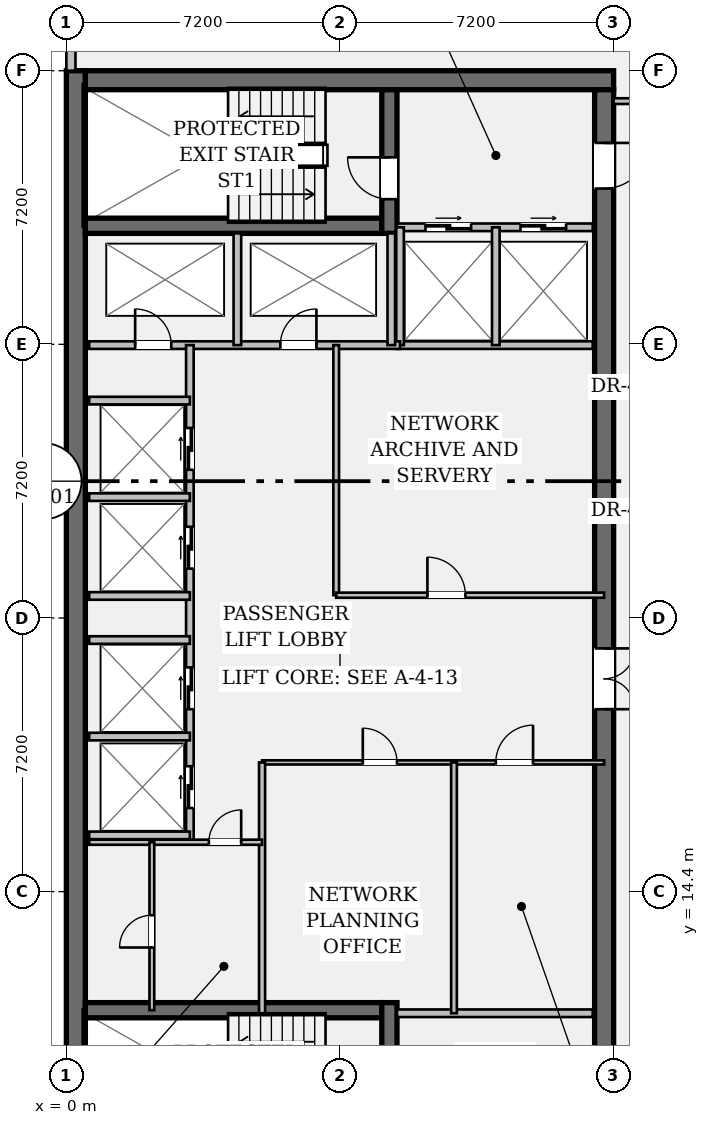
"""IFC4 building model, lengths in metres.
Left out: names, types, materials, properties, quantities, classifications, styles, units other than length and angle.
Written with IfcOpenShell. Run it as: python <this file> out.ifc"""

import sys

from ifc_helpers import new_model, si_unit, direction, frame, frame_2d, origin, place, context, subcontext, project, spatial, rectangle, extrude, element, fill, save


model = new_model("IFC4")
c1 = context("Model", 3, precision=1e-05, world=origin(), true_north=direction((0.0, 1.0)))
c2 = subcontext(c1, "Body", "Model", "MODEL_VIEW")
j1 = project(units=[si_unit("LENGTHUNIT", "METRE"), si_unit("PLANEANGLEUNIT", "RADIAN")], contexts=[c1])
p1 = place(None, origin())
s1 = spatial("IfcSite", under=j1, at=p1, CompositionType="ELEMENT")
p2 = place(p1, origin())
s2 = spatial("IfcBuilding", under=s1, at=p2, CompositionType="ELEMENT")
p3 = place(p2, frame((0.0, 0.0, 262.15)))
s3 = spatial("IfcBuildingStorey", under=s2, at=p3, CompositionType="ELEMENT", Elevation=262.15)
p4 = place(p3, frame((0.25, 7.2, 0.0), z_axis=(0.0, 0.0, 1.0), x_axis=(0.0, 1.0, 0.0)))
e1 = element("IfcWall", 1, at=p4, inside=s3, PredefinedType="SHEAR", context=c2, shape_type="SweptSolid", body=[
    extrude(rectangle(XDim=28.8, YDim=0.5, at=frame_2d((14.4, 0.0))), origin(), (0.0, 0.0, 1.0), 3.24),
])
p5 = place(p3, frame((0.5, 35.75, 0.0), z_axis=(0.0, 0.0, 1.0), x_axis=(1.0, 0.0, 0.0)))
e2 = element("IfcWall", 2, at=p5, inside=s3, PredefinedType="SHEAR", context=c2, shape_type="SweptSolid", body=[
    extrude(rectangle(XDim=13.9, YDim=0.5, at=frame_2d((6.95, 0.0))), origin(), (0.0, 0.0, 1.0), 3.24),
])
p6 = place(p3, frame((14.15, 35.5, 0.0), z_axis=(0.0, 0.0, 1.0), x_axis=(0.0, -1.0, 0.0)))
e3 = element("IfcWall", 3, at=p6, inside=s3, PredefinedType="SHEAR", context=c2, shape_type="SweptSolid", body=[
    extrude(rectangle(XDim=27.8, YDim=0.5, at=frame_2d((13.9, 0.0))), origin(), (0.0, 0.0, 1.0), 3.24),
])
p7 = place(p6, frame((1.4, 0.0, 0.0)))
e4 = element("IfcOpeningElement", 4, at=p7, cuts=e3, PredefinedType="OPENING", context=c2, shape_type="SweptSolid", body=[
    extrude(rectangle(XDim=1.2, YDim=2.15, at=frame_2d((0.6, 1.075))), frame((0.0, 0.262, 0.0), z_axis=(0.0, -1.0, 0.0), x_axis=(1.0, 0.0, 0.0)), (0.0, 0.0, 1.0), 0.524),
])
p8 = place(p6, frame((25.35, 0.0, 0.0)))
e5 = element("IfcOpeningElement", 5, at=p8, cuts=e3, PredefinedType="OPENING", context=c2, shape_type="SweptSolid", body=[
    extrude(rectangle(XDim=1.2, YDim=2.15, at=frame_2d((0.6, 1.075))), frame((0.0, 0.262, 0.0), z_axis=(0.0, -1.0, 0.0), x_axis=(1.0, 0.0, 0.0)), (0.0, 0.0, 1.0), 0.524),
])
p9 = place(p6, frame((14.7, 0.0, 0.0)))
e6 = element("IfcOpeningElement", 6, at=p9, cuts=e3, PredefinedType="OPENING", context=c2, shape_type="SweptSolid", body=[
    extrude(rectangle(XDim=1.6, YDim=2.2, at=frame_2d((0.8, 1.1))), frame((0.0, 0.262, 0.0), z_axis=(0.0, -1.0, 0.0), x_axis=(1.0, 0.0, 0.0)), (0.0, 0.0, 1.0), 0.524),
])
for number, where, z_axis, x_axis in (
    (7, (0.5, 31.92, 0.0), (0.0, 0.0, 1.0), (1.0, 0.0, 0.0)),
    (8, (0.5, 11.28, 0.0), (0.0, 0.0, 1.0), (1.0, 0.0, 0.0)),
):
    element("IfcWall", number, at=place(p3, frame(where, z_axis=z_axis, x_axis=x_axis)), inside=s3, PredefinedType="SHEAR", context=c2, shape_type="SweptSolid", body=[
        extrude(rectangle(XDim=7.8, YDim=0.4, at=frame_2d((3.9, 0.0))), origin(), (0.0, 0.0, 1.0), 3.24),
    ])
p10 = place(p3, frame((8.5, 31.72, 0.0), z_axis=(0.0, 0.0, 1.0), x_axis=(0.0, 1.0, 0.0)))
e9 = element("IfcWall", 9, at=p10, inside=s3, PredefinedType="SHEAR", context=c2, shape_type="SweptSolid", body=[
    extrude(rectangle(XDim=3.78, YDim=0.4, at=frame_2d((1.89, 0.0))), origin(), (0.0, 0.0, 1.0), 3.24),
])
p11 = place(p10, frame((0.9, 0.0, 0.0)))
e10 = element("IfcOpeningElement", 10, at=p11, cuts=e9, PredefinedType="OPENING", context=c2, shape_type="SweptSolid", body=[
    extrude(rectangle(XDim=1.1, YDim=2.15, at=frame_2d((0.55, 1.075))), frame((0.0, 0.212, 0.0), z_axis=(0.0, -1.0, 0.0), x_axis=(1.0, 0.0, 0.0)), (0.0, 0.0, 1.0), 0.424),
])
p12 = place(p3, frame((8.5, 7.7, 0.0), z_axis=(0.0, 0.0, 1.0), x_axis=(0.0, 1.0, 0.0)))
e11 = element("IfcWall", 11, at=p12, inside=s3, PredefinedType="SHEAR", context=c2, shape_type="SweptSolid", body=[
    extrude(rectangle(XDim=3.78, YDim=0.4, at=frame_2d((1.89, 0.0))), origin(), (0.0, 0.0, 1.0), 3.24),
])
p13 = place(p12, frame((0.85, 0.0, 0.0)))
e12 = element("IfcOpeningElement", 12, at=p13, cuts=e11, PredefinedType="OPENING", context=c2, shape_type="SweptSolid", body=[
    extrude(rectangle(XDim=1.1, YDim=2.15, at=frame_2d((0.55, 1.075))), frame((0.0, 0.212, 0.0), z_axis=(0.0, -1.0, 0.0), x_axis=(1.0, 0.0, 0.0)), (0.0, 0.0, 1.0), 0.424),
])
p14 = place(p3, frame((0.12, 36.0, 0.0), z_axis=(0.0, 0.0, 1.0), x_axis=(0.0, 1.0, 0.0)))
e13 = element("IfcWall", 13, at=p14, inside=s3, PredefinedType="STANDARD", context=c2, shape_type="SweptSolid", body=[
    extrude(rectangle(XDim=1.29, YDim=0.24, at=frame_2d((0.645, 0.0))), origin(), (0.0, 0.0, 1.0), 3.24),
])
p15 = place(p3, frame((8.7, 31.88, 0.0), z_axis=(0.0, 0.0, 1.0), x_axis=(1.0, 0.0, 0.0)))
e14 = element("IfcWall", 14, at=p15, inside=s3, PredefinedType="PARTITIONING", context=c2, shape_type="SweptSolid", body=[
    extrude(rectangle(XDim=5.15, YDim=0.2, at=frame_2d((2.575, 0.0))), origin(), (0.0, 0.0, 1.0), 3.24),
])
p16 = place(p15, frame((0.75, 0.0, 0.0)))
e15 = element("IfcOpeningElement", 15, at=p16, cuts=e14, PredefinedType="OPENING", context=c2, shape_type="SweptSolid", body=[
    extrude(rectangle(XDim=1.2, YDim=2.2, at=frame_2d((0.6, 1.1))), frame((0.0, 0.112, 0.0), z_axis=(0.0, -1.0, 0.0), x_axis=(1.0, 0.0, 0.0)), (0.0, 0.0, 1.0), 0.224),
])
p17 = place(p15, frame((3.25, 0.0, 0.0)))
e16 = element("IfcOpeningElement", 16, at=p17, cuts=e14, PredefinedType="OPENING", context=c2, shape_type="SweptSolid", body=[
    extrude(rectangle(XDim=1.2, YDim=2.2, at=frame_2d((0.6, 1.1))), frame((0.0, 0.112, 0.0), z_axis=(0.0, -1.0, 0.0), x_axis=(1.0, 0.0, 0.0)), (0.0, 0.0, 1.0), 0.224),
])
for number, where, z_axis, x_axis in (
    (17, (8.7, 11.2, 0.0), (0.0, 0.0, 1.0), (1.0, 0.0, 0.0)),
    (18, (8.7, 28.78, 0.0), (0.0, 0.0, 1.0), (1.0, 0.0, 0.0)),
):
    element("IfcWall", number, at=place(p3, frame(where, z_axis=z_axis, x_axis=x_axis)), inside=s3, PredefinedType="PARTITIONING", context=c2, shape_type="SweptSolid", body=[
        extrude(rectangle(XDim=5.15, YDim=0.2, at=frame_2d((2.575, 0.0))), origin(), (0.0, 0.0, 1.0), 3.24),
    ])
for number, where, z_axis, x_axis in (
    (19, (8.78, 28.78, 0.0), (0.0, 0.0, 1.0), (0.0, 1.0, 0.0)),
    (20, (11.3, 28.78, 0.0), (0.0, 0.0, 1.0), (0.0, 1.0, 0.0)),
):
    element("IfcWall", number, at=place(p3, frame(where, z_axis=z_axis, x_axis=x_axis)), inside=s3, PredefinedType="PARTITIONING", context=c2, shape_type="SweptSolid", body=[
        extrude(rectangle(XDim=3.1, YDim=0.2, at=frame_2d((1.55, 0.0))), origin(), (0.0, 0.0, 1.0), 3.24),
    ])
p18 = place(p3, frame((0.6, 28.78, 0.0), z_axis=(0.0, 0.0, 1.0), x_axis=(1.0, 0.0, 0.0)))
e21 = element("IfcWall", 21, at=p18, inside=s3, PredefinedType="PARTITIONING", context=c2, shape_type="SweptSolid", body=[
    extrude(rectangle(XDim=8.18, YDim=0.2, at=frame_2d((4.09, 0.0))), origin(), (0.0, 0.0, 1.0), 3.24),
])
p19 = place(p18, frame((1.21, 0.0, 0.0)))
e22 = element("IfcOpeningElement", 22, at=p19, cuts=e21, PredefinedType="OPENING", context=c2, shape_type="SweptSolid", body=[
    extrude(rectangle(XDim=0.95, YDim=2.15, at=frame_2d((0.475, 1.075))), frame((0.0, 0.112, 0.0), z_axis=(0.0, -1.0, 0.0), x_axis=(1.0, 0.0, 0.0)), (0.0, 0.0, 1.0), 0.224),
])
p20 = place(p18, frame((5.03, 0.0, 0.0)))
e23 = element("IfcOpeningElement", 23, at=p20, cuts=e21, PredefinedType="OPENING", context=c2, shape_type="SweptSolid", body=[
    extrude(rectangle(XDim=0.95, YDim=2.15, at=frame_2d((0.475, 1.075))), frame((0.0, 0.112, 0.0), z_axis=(0.0, -1.0, 0.0), x_axis=(1.0, 0.0, 0.0)), (0.0, 0.0, 1.0), 0.224),
])
for number, where, z_axis, x_axis in (
    (24, (4.5, 28.78, 0.0), (0.0, 0.0, 1.0), (0.0, 1.0, 0.0)),
    (25, (8.55, 28.78, 0.0), (0.0, 0.0, 1.0), (0.0, 1.0, 0.0)),
):
    element("IfcWall", number, at=place(p3, frame(where, z_axis=z_axis, x_axis=x_axis)), inside=s3, PredefinedType="PARTITIONING", context=c2, shape_type="SweptSolid", body=[
        extrude(rectangle(XDim=2.94, YDim=0.2, at=frame_2d((1.47, 0.0))), origin(), (0.0, 0.0, 1.0), 3.24),
    ])
p21 = place(p3, frame((3.25, 15.7, 0.0), z_axis=(0.0, 0.0, 1.0), x_axis=(0.0, 1.0, 0.0)))
e26 = element("IfcWall", 26, at=p21, inside=s3, PredefinedType="PARTITIONING", context=c2, shape_type="SweptSolid", body=[
    extrude(rectangle(XDim=13.08, YDim=0.2, at=frame_2d((6.54, 0.0))), origin(), (0.0, 0.0, 1.0), 3.24),
])
p22 = place(p21, frame((0.9, 0.0, 0.0)))
e27 = element("IfcOpeningElement", 27, at=p22, cuts=e26, PredefinedType="OPENING", context=c2, shape_type="SweptSolid", body=[
    extrude(rectangle(XDim=1.1, YDim=2.2, at=frame_2d((0.55, 1.1))), frame((0.0, 0.112, 0.0), z_axis=(0.0, -1.0, 0.0), x_axis=(1.0, 0.0, 0.0)), (0.0, 0.0, 1.0), 0.224),
])
p23 = place(p21, frame((3.5, 0.0, 0.0)))
e28 = element("IfcOpeningElement", 28, at=p23, cuts=e26, PredefinedType="OPENING", context=c2, shape_type="SweptSolid", body=[
    extrude(rectangle(XDim=1.1, YDim=2.2, at=frame_2d((0.55, 1.1))), frame((0.0, 0.112, 0.0), z_axis=(0.0, -1.0, 0.0), x_axis=(1.0, 0.0, 0.0)), (0.0, 0.0, 1.0), 0.224),
])
p24 = place(p21, frame((7.2, 0.0, 0.0)))
e29 = element("IfcOpeningElement", 29, at=p24, cuts=e26, PredefinedType="OPENING", context=c2, shape_type="SweptSolid", body=[
    extrude(rectangle(XDim=1.1, YDim=2.2, at=frame_2d((0.55, 1.1))), frame((0.0, 0.112, 0.0), z_axis=(0.0, -1.0, 0.0), x_axis=(1.0, 0.0, 0.0)), (0.0, 0.0, 1.0), 0.224),
])
p25 = place(p21, frame((9.8, 0.0, 0.0)))
e30 = element("IfcOpeningElement", 30, at=p25, cuts=e26, PredefinedType="OPENING", context=c2, shape_type="SweptSolid", body=[
    extrude(rectangle(XDim=1.1, YDim=2.2, at=frame_2d((0.55, 1.1))), frame((0.0, 0.112, 0.0), z_axis=(0.0, -1.0, 0.0), x_axis=(1.0, 0.0, 0.0)), (0.0, 0.0, 1.0), 0.224),
])
for number, where, z_axis, x_axis in (
    (31, (0.6, 15.88, 0.0), (0.0, 0.0, 1.0), (1.0, 0.0, 0.0)),
    (32, (0.6, 18.48, 0.0), (0.0, 0.0, 1.0), (1.0, 0.0, 0.0)),
    (33, (0.6, 22.18, 0.0), (0.0, 0.0, 1.0), (1.0, 0.0, 0.0)),
    (34, (0.6, 24.78, 0.0), (0.0, 0.0, 1.0), (1.0, 0.0, 0.0)),
    (35, (0.6, 21.02, 0.0), (0.0, 0.0, 1.0), (1.0, 0.0, 0.0)),
    (36, (0.6, 27.32, 0.0), (0.0, 0.0, 1.0), (1.0, 0.0, 0.0)),
):
    element("IfcWall", number, at=place(p3, frame(where, z_axis=z_axis, x_axis=x_axis)), inside=s3, PredefinedType="PARTITIONING", context=c2, shape_type="SweptSolid", body=[
        extrude(rectangle(XDim=2.65, YDim=0.2, at=frame_2d((1.325, 0.0))), origin(), (0.0, 0.0, 1.0), 3.24),
    ])
p26 = place(p3, frame((7.1, 22.2, 0.0), z_axis=(0.0, 0.0, 1.0), x_axis=(0.0, 1.0, 0.0)))
e37 = element("IfcWall", 37, at=p26, inside=s3, PredefinedType="PARTITIONING", context=c2, shape_type="SweptSolid", body=[
    extrude(rectangle(XDim=6.58, YDim=0.15, at=frame_2d((3.29, 0.0))), origin(), (0.0, 0.0, 1.0), 3.24),
])
p27 = place(p3, frame((7.1, 22.2, 0.0), z_axis=(0.0, 0.0, 1.0), x_axis=(1.0, 0.0, 0.0)))
e38 = element("IfcWall", 38, at=p27, inside=s3, PredefinedType="PARTITIONING", context=c2, shape_type="SweptSolid", body=[
    extrude(rectangle(XDim=7.05, YDim=0.135, at=frame_2d((3.525, 0.0))), origin(), (0.0, 0.0, 1.0), 3.24),
])
p28 = place(p27, frame((2.4, 0.0, 0.0)))
e39 = element("IfcOpeningElement", 39, at=p28, cuts=e38, PredefinedType="OPENING", context=c2, shape_type="SweptSolid", body=[
    extrude(rectangle(XDim=1.0, YDim=2.15, at=frame_2d((0.5, 1.075))), frame((0.0, 0.08, 0.0), z_axis=(0.0, -1.0, 0.0), x_axis=(1.0, 0.0, 0.0)), (0.0, 0.0, 1.0), 0.159),
])
p29 = place(p3, frame((5.15, 17.8, 0.0), z_axis=(0.0, 0.0, 1.0), x_axis=(1.0, 0.0, 0.0)))
e40 = element("IfcWall", 40, at=p29, inside=s3, PredefinedType="PARTITIONING", context=c2, shape_type="SweptSolid", body=[
    extrude(rectangle(XDim=9.0, YDim=0.11, at=frame_2d((4.5, 0.0))), origin(), (0.0, 0.0, 1.0), 3.24),
])
p30 = place(p29, frame((2.65, 0.0, 0.0)))
e41 = element("IfcOpeningElement", 41, at=p30, cuts=e40, PredefinedType="OPENING", context=c2, shape_type="SweptSolid", body=[
    extrude(rectangle(XDim=0.9, YDim=2.15, at=frame_2d((0.45, 1.075))), frame((0.0, 0.067, 0.0), z_axis=(0.0, -1.0, 0.0), x_axis=(1.0, 0.0, 0.0)), (0.0, 0.0, 1.0), 0.134),
])
p31 = place(p29, frame((6.15, 0.0, 0.0)))
e42 = element("IfcOpeningElement", 42, at=p31, cuts=e40, PredefinedType="OPENING", context=c2, shape_type="SweptSolid", body=[
    extrude(rectangle(XDim=0.98, YDim=2.15, at=frame_2d((0.49, 1.075))), frame((0.0, 0.067, 0.0), z_axis=(0.0, -1.0, 0.0), x_axis=(1.0, 0.0, 0.0)), (0.0, 0.0, 1.0), 0.134),
])
p32 = place(p3, frame((5.15, 11.2, 0.0), z_axis=(0.0, 0.0, 1.0), x_axis=(0.0, 1.0, 0.0)))
e43 = element("IfcWall", 43, at=p32, inside=s3, PredefinedType="PARTITIONING", context=c2, shape_type="SweptSolid", body=[
    extrude(rectangle(XDim=6.6, YDim=0.16, at=frame_2d((3.3, 0.0))), origin(), (0.0, 0.0, 1.0), 3.24),
])
p33 = place(p3, frame((10.2, 11.2, 0.0), z_axis=(0.0, 0.0, 1.0), x_axis=(0.0, 1.0, 0.0)))
e44 = element("IfcWall", 44, at=p33, inside=s3, PredefinedType="PARTITIONING", context=c2, shape_type="SweptSolid", body=[
    extrude(rectangle(XDim=6.6, YDim=0.15, at=frame_2d((3.3, 0.0))), origin(), (0.0, 0.0, 1.0), 3.24),
])
p34 = place(p3, frame((0.6, 15.7, 0.0), z_axis=(0.0, 0.0, 1.0), x_axis=(1.0, 0.0, 0.0)))
e45 = element("IfcWall", 45, at=p34, inside=s3, PredefinedType="PARTITIONING", context=c2, shape_type="SweptSolid", body=[
    extrude(rectangle(XDim=4.55, YDim=0.135, at=frame_2d((2.275, 0.0))), origin(), (0.0, 0.0, 1.0), 3.24),
])
p35 = place(p34, frame((3.15, 0.0, 0.0)))
e46 = element("IfcOpeningElement", 46, at=p35, cuts=e45, PredefinedType="OPENING", context=c2, shape_type="SweptSolid", body=[
    extrude(rectangle(XDim=0.85, YDim=2.15, at=frame_2d((0.425, 1.075))), frame((0.0, 0.08, 0.0), z_axis=(0.0, -1.0, 0.0), x_axis=(1.0, 0.0, 0.0)), (0.0, 0.0, 1.0), 0.159),
])
p36 = place(p3, frame((2.25, 11.28, 0.0), z_axis=(0.0, 0.0, 1.0), x_axis=(0.0, 1.0, 0.0)))
e47 = element("IfcWall", 47, at=p36, inside=s3, PredefinedType="PARTITIONING", context=c2, shape_type="SweptSolid", body=[
    extrude(rectangle(XDim=4.42, YDim=0.125, at=frame_2d((2.21, 0.0))), origin(), (0.0, 0.0, 1.0), 3.24),
])
p37 = place(p36, frame((1.65, 0.0, 0.0)))
e48 = element("IfcOpeningElement", 48, at=p37, cuts=e47, PredefinedType="OPENING", context=c2, shape_type="SweptSolid", body=[
    extrude(rectangle(XDim=0.85, YDim=2.15, at=frame_2d((0.425, 1.075))), frame((0.0, 0.074, 0.0), z_axis=(0.0, -1.0, 0.0), x_axis=(1.0, 0.0, 0.0)), (0.0, 0.0, 1.0), 0.149),
])
p38 = place(p3, frame((14.4, 35.2, 0.0), z_axis=(0.0, 0.0, 1.0), x_axis=(1.0, 0.0, 0.0)))
e49 = element("IfcWall", 49, at=p38, inside=s3, PredefinedType="PARTITIONING", context=c2, shape_type="SweptSolid", body=[
    extrude(rectangle(XDim=2.95, YDim=0.15, at=frame_2d((1.475, 0.0))), origin(), (0.0, 0.0, 1.0), 2.808),
])
p39 = place(p38, frame((0.95, 0.0, 0.0)))
e50 = element("IfcOpeningElement", 50, at=p39, cuts=e49, PredefinedType="OPENING", context=c2, shape_type="SweptSolid", body=[
    extrude(rectangle(XDim=1.0, YDim=2.15, at=frame_2d((0.5, 1.075))), frame((0.0, 0.087, 0.0), z_axis=(0.0, -1.0, 0.0), x_axis=(1.0, 0.0, 0.0)), (0.0, 0.0, 1.0), 0.174),
])
p40 = place(p11, origin())
e51 = element("IfcDoor", 51, at=p40, inside=s3, OperationType="SINGLE_SWING_RIGHT", PredefinedType="DOOR", context=c2, shape_type="SweptSolid", body=[
    extrude(rectangle(XDim=1.1, YDim=2.15, at=frame_2d((0.55, 1.075))), frame((0.0, 0.025, 0.0), z_axis=(0.0, -1.0, 0.0), x_axis=(1.0, 0.0, 0.0)), (0.0, 0.0, 1.0), 0.05),
])
fill(e10, e51)
p41 = place(p7, origin())
e52 = element("IfcDoor", 52, at=p41, inside=s3, OperationType="SINGLE_SWING_LEFT", PredefinedType="DOOR", context=c2, shape_type="SweptSolid", body=[
    extrude(rectangle(XDim=1.2, YDim=2.15, at=frame_2d((0.6, 1.075))), frame((0.0, 0.025, 0.0), z_axis=(0.0, -1.0, 0.0), x_axis=(1.0, 0.0, 0.0)), (0.0, 0.0, 1.0), 0.05),
])
fill(e4, e52)
p42 = place(p16, origin())
e53 = element("IfcDoor", 53, at=p42, inside=s3, OperationType="DOUBLE_DOOR_SLIDING", PredefinedType="DOOR", context=c2, shape_type="SweptSolid", body=[
    extrude(rectangle(XDim=1.2, YDim=2.2, at=frame_2d((0.6, 1.1))), frame((0.0, 0.025, 0.0), z_axis=(0.0, -1.0, 0.0), x_axis=(1.0, 0.0, 0.0)), (0.0, 0.0, 1.0), 0.05),
])
fill(e15, e53)
p43 = place(p17, origin())
e54 = element("IfcDoor", 54, at=p43, inside=s3, OperationType="DOUBLE_DOOR_SLIDING", PredefinedType="DOOR", context=c2, shape_type="SweptSolid", body=[
    extrude(rectangle(XDim=1.2, YDim=2.2, at=frame_2d((0.6, 1.1))), frame((0.0, 0.025, 0.0), z_axis=(0.0, -1.0, 0.0), x_axis=(1.0, 0.0, 0.0)), (0.0, 0.0, 1.0), 0.05),
])
fill(e16, e54)
p44 = place(p19, origin())
e55 = element("IfcDoor", 55, at=p44, inside=s3, OperationType="SINGLE_SWING_LEFT", PredefinedType="DOOR", context=c2, shape_type="SweptSolid", body=[
    extrude(rectangle(XDim=0.95, YDim=2.15, at=frame_2d((0.475, 1.075))), frame((0.0, 0.025, 0.0), z_axis=(0.0, -1.0, 0.0), x_axis=(1.0, 0.0, 0.0)), (0.0, 0.0, 1.0), 0.05),
])
fill(e22, e55)
p45 = place(p20, origin())
e56 = element("IfcDoor", 56, at=p45, inside=s3, OperationType="SINGLE_SWING_RIGHT", PredefinedType="DOOR", context=c2, shape_type="SweptSolid", body=[
    extrude(rectangle(XDim=0.95, YDim=2.15, at=frame_2d((0.475, 1.075))), frame((0.0, 0.025, 0.0), z_axis=(0.0, -1.0, 0.0), x_axis=(1.0, 0.0, 0.0)), (0.0, 0.0, 1.0), 0.05),
])
fill(e23, e56)
p46 = place(p9, origin())
e57 = element("IfcDoor", 57, at=p46, inside=s3, OperationType="DOUBLE_DOOR_SINGLE_SWING", PredefinedType="DOOR", context=c2, shape_type="SweptSolid", body=[
    extrude(rectangle(XDim=1.6, YDim=2.2, at=frame_2d((0.8, 1.1))), frame((0.0, 0.025, 0.0), z_axis=(0.0, -1.0, 0.0), x_axis=(1.0, 0.0, 0.0)), (0.0, 0.0, 1.0), 0.05),
])
fill(e6, e57)
p47 = place(p22, origin())
e58 = element("IfcDoor", 58, at=p47, inside=s3, OperationType="DOUBLE_DOOR_SLIDING", PredefinedType="DOOR", context=c2, shape_type="SweptSolid", body=[
    extrude(rectangle(XDim=1.1, YDim=2.2, at=frame_2d((0.55, 1.1))), frame((0.0, 0.025, 0.0), z_axis=(0.0, -1.0, 0.0), x_axis=(1.0, 0.0, 0.0)), (0.0, 0.0, 1.0), 0.05),
])
fill(e27, e58)
p48 = place(p23, origin())
e59 = element("IfcDoor", 59, at=p48, inside=s3, OperationType="DOUBLE_DOOR_SLIDING", PredefinedType="DOOR", context=c2, shape_type="SweptSolid", body=[
    extrude(rectangle(XDim=1.1, YDim=2.2, at=frame_2d((0.55, 1.1))), frame((0.0, 0.025, 0.0), z_axis=(0.0, -1.0, 0.0), x_axis=(1.0, 0.0, 0.0)), (0.0, 0.0, 1.0), 0.05),
])
fill(e28, e59)
p49 = place(p24, origin())
e60 = element("IfcDoor", 60, at=p49, inside=s3, OperationType="DOUBLE_DOOR_SLIDING", PredefinedType="DOOR", context=c2, shape_type="SweptSolid", body=[
    extrude(rectangle(XDim=1.1, YDim=2.2, at=frame_2d((0.55, 1.1))), frame((0.0, 0.025, 0.0), z_axis=(0.0, -1.0, 0.0), x_axis=(1.0, 0.0, 0.0)), (0.0, 0.0, 1.0), 0.05),
])
fill(e29, e60)
p50 = place(p25, origin())
e61 = element("IfcDoor", 61, at=p50, inside=s3, OperationType="DOUBLE_DOOR_SLIDING", PredefinedType="DOOR", context=c2, shape_type="SweptSolid", body=[
    extrude(rectangle(XDim=1.1, YDim=2.2, at=frame_2d((0.55, 1.1))), frame((0.0, 0.025, 0.0), z_axis=(0.0, -1.0, 0.0), x_axis=(1.0, 0.0, 0.0)), (0.0, 0.0, 1.0), 0.05),
])
fill(e30, e61)
p51 = place(p28, origin())
e62 = element("IfcDoor", 62, at=p51, inside=s3, OperationType="SINGLE_SWING_LEFT", PredefinedType="DOOR", context=c2, shape_type="SweptSolid", body=[
    extrude(rectangle(XDim=1.0, YDim=2.15, at=frame_2d((0.5, 1.075))), frame((0.0, 0.025, 0.0), z_axis=(0.0, -1.0, 0.0), x_axis=(1.0, 0.0, 0.0)), (0.0, 0.0, 1.0), 0.05),
])
fill(e39, e62)
p52 = place(p30, origin())
e63 = element("IfcDoor", 63, at=p52, inside=s3, OperationType="SINGLE_SWING_LEFT", PredefinedType="DOOR", context=c2, shape_type="SweptSolid", body=[
    extrude(rectangle(XDim=0.9, YDim=2.15, at=frame_2d((0.45, 1.075))), frame((0.0, 0.025, 0.0), z_axis=(0.0, -1.0, 0.0), x_axis=(1.0, 0.0, 0.0)), (0.0, 0.0, 1.0), 0.05),
])
fill(e41, e63)
p53 = place(p31, origin())
e64 = element("IfcDoor", 64, at=p53, inside=s3, OperationType="SINGLE_SWING_RIGHT", PredefinedType="DOOR", context=c2, shape_type="SweptSolid", body=[
    extrude(rectangle(XDim=0.98, YDim=2.15, at=frame_2d((0.49, 1.075))), frame((0.0, 0.025, 0.0), z_axis=(0.0, -1.0, 0.0), x_axis=(1.0, 0.0, 0.0)), (0.0, 0.0, 1.0), 0.05),
])
fill(e42, e64)
p54 = place(p35, origin())
e65 = element("IfcDoor", 65, at=p54, inside=s3, OperationType="SINGLE_SWING_RIGHT", PredefinedType="DOOR", context=c2, shape_type="SweptSolid", body=[
    extrude(rectangle(XDim=0.85, YDim=2.15, at=frame_2d((0.425, 1.075))), frame((0.0, 0.025, 0.0), z_axis=(0.0, -1.0, 0.0), x_axis=(1.0, 0.0, 0.0)), (0.0, 0.0, 1.0), 0.05),
])
fill(e46, e65)
p55 = place(p37, origin())
e66 = element("IfcDoor", 66, at=p55, inside=s3, OperationType="SINGLE_SWING_LEFT", PredefinedType="DOOR", context=c2, shape_type="SweptSolid", body=[
    extrude(rectangle(XDim=0.85, YDim=2.15, at=frame_2d((0.425, 1.075))), frame((0.0, 0.025, 0.0), z_axis=(0.0, -1.0, 0.0), x_axis=(1.0, 0.0, 0.0)), (0.0, 0.0, 1.0), 0.05),
])
fill(e48, e66)
save(model, sys.argv[1])
